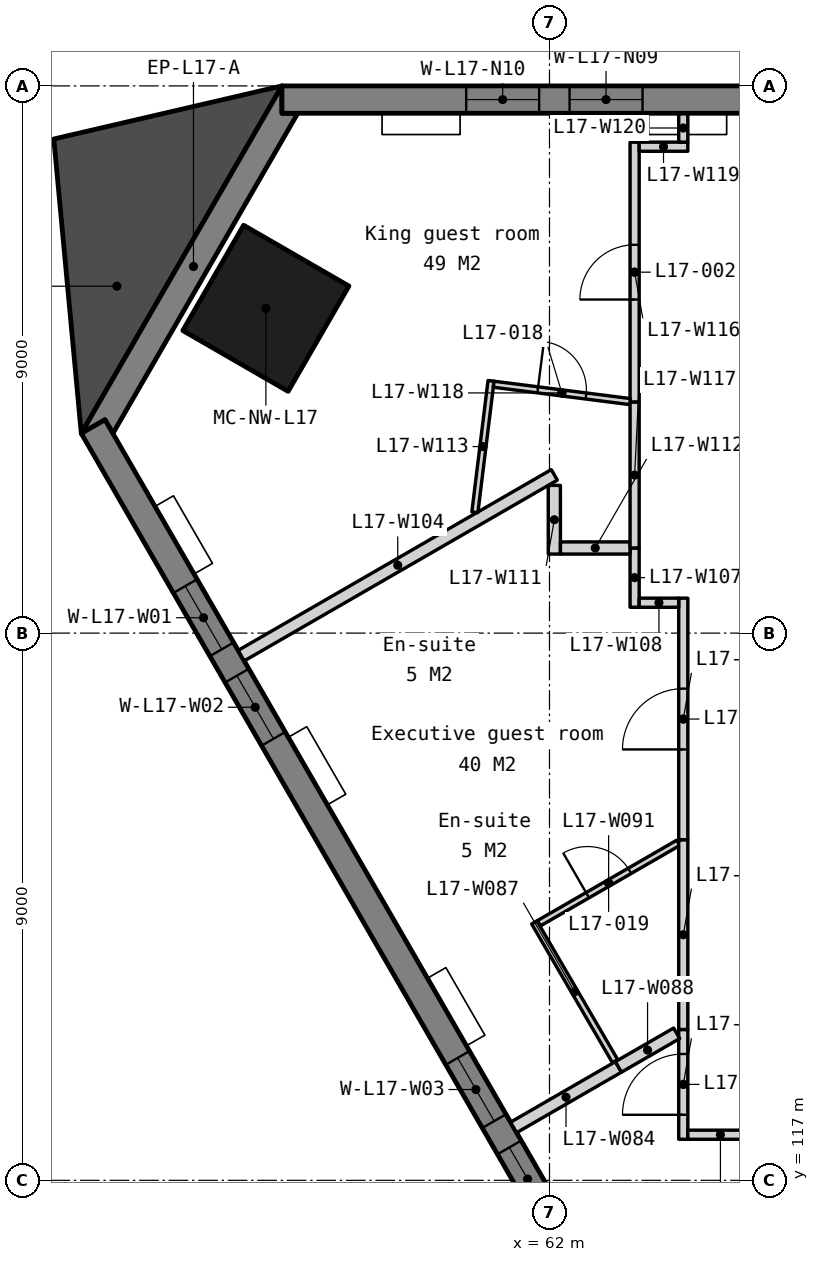
"""IFC4 building model, lengths in metres.
Left out: names, types, materials, properties, quantities, classifications, styles, units other than length and angle.
Written with IfcOpenShell. Run it as: python <this file> out.ifc"""

import sys

from ifc_helpers import new_model, si_unit, direction, frame, frame_2d, origin, origin_2d, place, context, subcontext, project, spatial, polyline, rectangle, outline, extrude, element, fill, save


model = new_model("IFC4")
c1 = context("Model", 3, precision=1e-05, world=origin(), true_north=direction((0.0, 1.0)))
c2 = subcontext(c1, "Body", "Model", "MODEL_VIEW")
j1 = project(units=[si_unit("LENGTHUNIT", "METRE"), si_unit("PLANEANGLEUNIT", "RADIAN")], contexts=[c1])
p1 = place(None, origin())
s1 = spatial("IfcSite", under=j1, at=p1, CompositionType="ELEMENT")
p2 = place(p1, origin())
s2 = spatial("IfcBuilding", under=s1, at=p2, CompositionType="ELEMENT")
p3 = place(p2, frame((0.0, 0.0, 73.5)))
s3 = spatial("IfcBuildingStorey", under=s2, at=p3, CompositionType="ELEMENT", Elevation=73.5)
p4 = place(p3, frame((57.336, 131.342, 0.0), z_axis=(0.0, 0.0, 1.0), x_axis=(-0.5, -0.866025403784, 0.0)))
e1 = element("IfcColumn", 1, at=p4, inside=s3, PredefinedType="COLUMN", context=c2, shape_type="SweptSolid", body=[
    extrude(rectangle(XDim=2.0, YDim=2.0, at=origin_2d()), origin(), (0.0, 0.0, 1.0), 3.5),
])
p5 = place(p3, frame((0.0, 0.0, -0.15)))
e2 = element("IfcWall", 2, at=p5, inside=s3, PredefinedType="SOLIDWALL", context=c2, shape_type="SweptSolid", body=[
    extrude(outline(polyline([(57.6, 135.0), (57.6, 134.55), (57.86, 134.55), (54.82, 129.284), (54.69, 129.509), (54.3, 129.284), (57.6, 135.0)])), origin(), (0.0, 0.0, 1.0), 3.4),
])
p6 = place(p3, frame((102.4, 134.775, -0.15), z_axis=(0.0, 0.0, 1.0), x_axis=(-1.0, 0.0, 0.0)))
e3 = element("IfcWall", 3, at=p6, inside=s3, PredefinedType="SOLIDWALL", context=c2, shape_type="SweptSolid", body=[
    extrude(outline(polyline([(44.8, 0.0), (44.8, 3.4), (0.0, 3.4), (0.0, 0.0), (44.8, 0.0)])), frame((0.0, 0.225, 0.0), z_axis=(0.0, -1.0, 0.0), x_axis=(1.0, 0.0, 0.0)), (0.0, 0.0, 1.0), 0.45),
])
p7 = place(p6, frame((3.03, 0.0, 1.05)))
e4 = element("IfcOpeningElement", 4, at=p7, cuts=e3, PredefinedType="OPENING", context=c2, shape_type="SweptSolid", body=[
    extrude(rectangle(XDim=1.2, YDim=1.5, at=frame_2d((0.6, 0.75))), frame((0.0, 0.235, 0.0), z_axis=(0.0, -1.0, 0.0), x_axis=(1.0, 0.0, 0.0)), (0.0, 0.0, 1.0), 0.47),
])
p8 = place(p6, frame((4.73, 0.0, 1.05)))
e5 = element("IfcOpeningElement", 5, at=p8, cuts=e3, PredefinedType="OPENING", context=c2, shape_type="SweptSolid", body=[
    extrude(rectangle(XDim=1.2, YDim=1.5, at=frame_2d((0.6, 0.75))), frame((0.0, 0.235, 0.0), z_axis=(0.0, -1.0, 0.0), x_axis=(1.0, 0.0, 0.0)), (0.0, 0.0, 1.0), 0.47),
])
p9 = place(p6, frame((11.99, 0.0, 1.05)))
e6 = element("IfcOpeningElement", 6, at=p9, cuts=e3, PredefinedType="OPENING", context=c2, shape_type="SweptSolid", body=[
    extrude(rectangle(XDim=1.2, YDim=1.5, at=frame_2d((0.6, 0.75))), frame((0.0, 0.235, 0.0), z_axis=(0.0, -1.0, 0.0), x_axis=(1.0, 0.0, 0.0)), (0.0, 0.0, 1.0), 0.47),
])
p10 = place(p6, frame((13.69, 0.0, 1.05)))
e7 = element("IfcOpeningElement", 7, at=p10, cuts=e3, PredefinedType="OPENING", context=c2, shape_type="SweptSolid", body=[
    extrude(rectangle(XDim=1.2, YDim=1.5, at=frame_2d((0.6, 0.75))), frame((0.0, 0.235, 0.0), z_axis=(0.0, -1.0, 0.0), x_axis=(1.0, 0.0, 0.0)), (0.0, 0.0, 1.0), 0.47),
])
p11 = place(p6, frame((20.95, 0.0, 1.05)))
e8 = element("IfcOpeningElement", 8, at=p11, cuts=e3, PredefinedType="OPENING", context=c2, shape_type="SweptSolid", body=[
    extrude(rectangle(XDim=1.2, YDim=1.5, at=frame_2d((0.6, 0.75))), frame((0.0, 0.235, 0.0), z_axis=(0.0, -1.0, 0.0), x_axis=(1.0, 0.0, 0.0)), (0.0, 0.0, 1.0), 0.47),
])
p12 = place(p6, frame((22.65, 0.0, 1.05)))
e9 = element("IfcOpeningElement", 9, at=p12, cuts=e3, PredefinedType="OPENING", context=c2, shape_type="SweptSolid", body=[
    extrude(rectangle(XDim=1.2, YDim=1.5, at=frame_2d((0.6, 0.75))), frame((0.0, 0.235, 0.0), z_axis=(0.0, -1.0, 0.0), x_axis=(1.0, 0.0, 0.0)), (0.0, 0.0, 1.0), 0.47),
])
p13 = place(p6, frame((29.91, 0.0, 1.05)))
e10 = element("IfcOpeningElement", 10, at=p13, cuts=e3, PredefinedType="OPENING", context=c2, shape_type="SweptSolid", body=[
    extrude(rectangle(XDim=1.2, YDim=1.5, at=frame_2d((0.6, 0.75))), frame((0.0, 0.235, 0.0), z_axis=(0.0, -1.0, 0.0), x_axis=(1.0, 0.0, 0.0)), (0.0, 0.0, 1.0), 0.47),
])
p14 = place(p6, frame((31.61, 0.0, 1.05)))
e11 = element("IfcOpeningElement", 11, at=p14, cuts=e3, PredefinedType="OPENING", context=c2, shape_type="SweptSolid", body=[
    extrude(rectangle(XDim=1.2, YDim=1.5, at=frame_2d((0.6, 0.75))), frame((0.0, 0.235, 0.0), z_axis=(0.0, -1.0, 0.0), x_axis=(1.0, 0.0, 0.0)), (0.0, 0.0, 1.0), 0.47),
])
p15 = place(p6, frame((38.87, 0.0, 1.05)))
e12 = element("IfcOpeningElement", 12, at=p15, cuts=e3, PredefinedType="OPENING", context=c2, shape_type="SweptSolid", body=[
    extrude(rectangle(XDim=1.2, YDim=1.5, at=frame_2d((0.6, 0.75))), frame((0.0, 0.235, 0.0), z_axis=(0.0, -1.0, 0.0), x_axis=(1.0, 0.0, 0.0)), (0.0, 0.0, 1.0), 0.47),
])
p16 = place(p6, frame((40.57, 0.0, 1.05)))
e13 = element("IfcOpeningElement", 13, at=p16, cuts=e3, PredefinedType="OPENING", context=c2, shape_type="SweptSolid", body=[
    extrude(rectangle(XDim=1.2, YDim=1.5, at=frame_2d((0.6, 0.75))), frame((0.0, 0.235, 0.0), z_axis=(0.0, -1.0, 0.0), x_axis=(1.0, 0.0, 0.0)), (0.0, 0.0, 1.0), 0.47),
])
p17 = place(p3, frame((54.495, 129.397, -0.15), z_axis=(0.0, 0.0, 1.0), x_axis=(0.499999201451, -0.866025864826, 0.0)))
e14 = element("IfcWall", 14, at=p17, inside=s3, PredefinedType="SOLIDWALL", context=c2, shape_type="SweptSolid", body=[
    extrude(outline(polyline([(44.8, 0.0), (44.8, 3.4), (0.0, 3.4), (0.0, 0.0), (44.8, 0.0)])), frame((0.0, 0.225, 0.0), z_axis=(0.0, -1.0, 0.0), x_axis=(1.0, 0.0, 0.0)), (0.0, 0.0, 1.0), 0.45),
])
p18 = place(p17, frame((3.03, 0.0, 1.05)))
e15 = element("IfcOpeningElement", 15, at=p18, cuts=e14, PredefinedType="OPENING", context=c2, shape_type="SweptSolid", body=[
    extrude(rectangle(XDim=1.2, YDim=1.5, at=frame_2d((0.6, 0.75))), frame((0.0, 0.235, 0.0), z_axis=(0.0, -1.0, 0.0), x_axis=(1.0, 0.0, 0.0)), (0.0, 0.0, 1.0), 0.47),
])
p19 = place(p17, frame((4.73, 0.0, 1.05)))
e16 = element("IfcOpeningElement", 16, at=p19, cuts=e14, PredefinedType="OPENING", context=c2, shape_type="SweptSolid", body=[
    extrude(rectangle(XDim=1.2, YDim=1.5, at=frame_2d((0.6, 0.75))), frame((0.0, 0.235, 0.0), z_axis=(0.0, -1.0, 0.0), x_axis=(1.0, 0.0, 0.0)), (0.0, 0.0, 1.0), 0.47),
])
p20 = place(p17, frame((11.99, 0.0, 1.05)))
e17 = element("IfcOpeningElement", 17, at=p20, cuts=e14, PredefinedType="OPENING", context=c2, shape_type="SweptSolid", body=[
    extrude(rectangle(XDim=1.2, YDim=1.5, at=frame_2d((0.6, 0.75))), frame((0.0, 0.235, 0.0), z_axis=(0.0, -1.0, 0.0), x_axis=(1.0, 0.0, 0.0)), (0.0, 0.0, 1.0), 0.47),
])
p21 = place(p17, frame((13.69, 0.0, 1.05)))
e18 = element("IfcOpeningElement", 18, at=p21, cuts=e14, PredefinedType="OPENING", context=c2, shape_type="SweptSolid", body=[
    extrude(rectangle(XDim=1.2, YDim=1.5, at=frame_2d((0.6, 0.75))), frame((0.0, 0.235, 0.0), z_axis=(0.0, -1.0, 0.0), x_axis=(1.0, 0.0, 0.0)), (0.0, 0.0, 1.0), 0.47),
])
p22 = place(p17, frame((20.95, 0.0, 1.05)))
e19 = element("IfcOpeningElement", 19, at=p22, cuts=e14, PredefinedType="OPENING", context=c2, shape_type="SweptSolid", body=[
    extrude(rectangle(XDim=1.2, YDim=1.5, at=frame_2d((0.6, 0.75))), frame((0.0, 0.235, 0.0), z_axis=(0.0, -1.0, 0.0), x_axis=(1.0, 0.0, 0.0)), (0.0, 0.0, 1.0), 0.47),
])
p23 = place(p17, frame((22.65, 0.0, 1.05)))
e20 = element("IfcOpeningElement", 20, at=p23, cuts=e14, PredefinedType="OPENING", context=c2, shape_type="SweptSolid", body=[
    extrude(rectangle(XDim=1.2, YDim=1.5, at=frame_2d((0.6, 0.75))), frame((0.0, 0.235, 0.0), z_axis=(0.0, -1.0, 0.0), x_axis=(1.0, 0.0, 0.0)), (0.0, 0.0, 1.0), 0.47),
])
p24 = place(p17, frame((29.91, 0.0, 1.05)))
e21 = element("IfcOpeningElement", 21, at=p24, cuts=e14, PredefinedType="OPENING", context=c2, shape_type="SweptSolid", body=[
    extrude(rectangle(XDim=1.2, YDim=1.5, at=frame_2d((0.6, 0.75))), frame((0.0, 0.235, 0.0), z_axis=(0.0, -1.0, 0.0), x_axis=(1.0, 0.0, 0.0)), (0.0, 0.0, 1.0), 0.47),
])
p25 = place(p17, frame((31.61, 0.0, 1.05)))
e22 = element("IfcOpeningElement", 22, at=p25, cuts=e14, PredefinedType="OPENING", context=c2, shape_type="SweptSolid", body=[
    extrude(rectangle(XDim=1.2, YDim=1.5, at=frame_2d((0.6, 0.75))), frame((0.0, 0.235, 0.0), z_axis=(0.0, -1.0, 0.0), x_axis=(1.0, 0.0, 0.0)), (0.0, 0.0, 1.0), 0.47),
])
p26 = place(p17, frame((38.87, 0.0, 1.05)))
e23 = element("IfcOpeningElement", 23, at=p26, cuts=e14, PredefinedType="OPENING", context=c2, shape_type="SweptSolid", body=[
    extrude(rectangle(XDim=1.2, YDim=1.5, at=frame_2d((0.6, 0.75))), frame((0.0, 0.235, 0.0), z_axis=(0.0, -1.0, 0.0), x_axis=(1.0, 0.0, 0.0)), (0.0, 0.0, 1.0), 0.47),
])
p27 = place(p17, frame((40.57, 0.0, 1.05)))
e24 = element("IfcOpeningElement", 24, at=p27, cuts=e14, PredefinedType="OPENING", context=c2, shape_type="SweptSolid", body=[
    extrude(rectangle(XDim=1.2, YDim=1.5, at=frame_2d((0.6, 0.75))), frame((0.0, 0.235, 0.0), z_axis=(0.0, -1.0, 0.0), x_axis=(1.0, 0.0, 0.0)), (0.0, 0.0, 1.0), 0.47),
])
p28 = place(p3, frame((0.0, 0.0, -0.15)))
e25 = element("IfcWall", 25, at=p28, inside=s3, PredefinedType="SOLIDWALL", context=c2, shape_type="SweptSolid", body=[
    extrude(outline(polyline([(57.6, 135.0), (53.848, 134.127), (54.3, 129.284), (57.6, 135.0)])), origin(), (0.0, 0.0, 1.0), 3.4),
])
p29 = place(p3, frame((64.2, 117.675, 0.0), z_axis=(0.0, 0.0, 1.0), x_axis=(0.0, 1.0, 0.0)))
e26 = element("IfcWall", 26, at=p29, inside=s3, PredefinedType="PARTITIONING", context=c2, shape_type="SweptSolid", body=[
    extrude(rectangle(XDim=1.806, YDim=0.15, at=frame_2d((0.903, 0.0))), origin(), (0.0, 0.0, 1.0), 3.25),
])
p30 = place(p29, frame((0.403, 0.0, 0.0)))
e27 = element("IfcOpeningElement", 27, at=p30, cuts=e26, PredefinedType="OPENING", context=c2, shape_type="SweptSolid", body=[
    extrude(rectangle(XDim=1.0, YDim=2.1, at=frame_2d((0.5, 1.05))), frame((0.0, 0.085, 0.0), z_axis=(0.0, -1.0, 0.0), x_axis=(1.0, 0.0, 0.0)), (0.0, 0.0, 1.0), 0.17),
])
p31 = place(p3, frame((64.275, 117.75, 0.0), z_axis=(0.0, 0.0, 1.0), x_axis=(1.0, 0.0, 0.0)))
e28 = element("IfcWall", 28, at=p31, inside=s3, PredefinedType="PARTITIONING", context=c2, shape_type="SweptSolid", body=[
    extrude(rectangle(XDim=1.072, YDim=0.15, at=frame_2d((0.536, 0.0))), origin(), (0.0, 0.0, 1.0), 3.25),
])
p32 = place(p3, frame((61.41, 117.87, 0.0), z_axis=(0.0, 0.0, 1.0), x_axis=(0.866038551572, 0.499977226672, 0.0)))
e29 = element("IfcWall", 29, at=p32, inside=s3, PredefinedType="PARTITIONING", context=c2, shape_type="SweptSolid", body=[
    extrude(rectangle(XDim=1.991, YDim=0.2, at=frame_2d((0.995, 0.0))), origin(), (0.0, 0.0, 1.0), 3.25),
])
p33 = place(p3, frame((61.75, 121.242, 0.0), z_axis=(0.0, 0.0, 1.0), x_axis=(0.503163628445, -0.86419116115, 0.0)))
e30 = element("IfcWall", 30, at=p33, inside=s3, PredefinedType="PARTITIONING", context=c2, shape_type="SweptSolid", body=[
    extrude(rectangle(XDim=2.64, YDim=0.1, at=frame_2d((1.32, 0.0))), origin(), (0.0, 0.0, 1.0), 3.25),
])
p34 = place(p3, frame((63.134, 118.865, 0.0), z_axis=(0.0, 0.0, 1.0), x_axis=(0.866075331272, 0.499913513082, 0.0)))
e31 = element("IfcWall", 31, at=p34, inside=s3, PredefinedType="PARTITIONING", context=c2, shape_type="SweptSolid", body=[
    extrude(rectangle(XDim=1.106, YDim=0.2, at=frame_2d((0.553, 0.0))), origin(), (0.0, 0.0, 1.0), 3.25),
])
p35 = place(p3, frame((61.827, 121.229, 0.0), z_axis=(0.0, 0.0, 1.0), x_axis=(0.86601342167, 0.500020753057, 0.0)))
e32 = element("IfcWall", 32, at=p35, inside=s3, PredefinedType="PARTITIONING", context=c2, shape_type="SweptSolid", body=[
    extrude(rectangle(XDim=2.645, YDim=0.1, at=frame_2d((1.323, 0.0))), origin(), (0.0, 0.0, 1.0), 3.25),
])
p36 = place(p35, frame((0.923, 0.0, 0.0)))
e33 = element("IfcOpeningElement", 33, at=p36, cuts=e32, PredefinedType="OPENING", context=c2, shape_type="SweptSolid", body=[
    extrude(rectangle(XDim=0.8, YDim=2.1, at=frame_2d((0.4, 1.05))), frame((0.0, 0.06, 0.0), z_axis=(0.0, -1.0, 0.0), x_axis=(1.0, 0.0, 0.0)), (0.0, 0.0, 1.0), 0.12),
])
p37 = place(p3, frame((64.2, 122.599, 0.0), z_axis=(0.0, 0.0, 1.0), x_axis=(0.0, 1.0, 0.0)))
e34 = element("IfcWall", 34, at=p37, inside=s3, PredefinedType="PARTITIONING", context=c2, shape_type="SweptSolid", body=[
    extrude(rectangle(XDim=3.976, YDim=0.15, at=frame_2d((1.988, 0.0))), origin(), (0.0, 0.0, 1.0), 3.25),
])
p38 = place(p37, frame((1.488, 0.0, 0.0)))
e35 = element("IfcOpeningElement", 35, at=p38, cuts=e34, PredefinedType="OPENING", context=c2, shape_type="SweptSolid", body=[
    extrude(rectangle(XDim=1.0, YDim=2.1, at=frame_2d((0.5, 1.05))), frame((0.0, 0.085, 0.0), z_axis=(0.0, -1.0, 0.0), x_axis=(1.0, 0.0, 0.0)), (0.0, 0.0, 1.0), 0.17),
])
p39 = place(p3, frame((64.2, 119.481, 0.0), z_axis=(0.0, 0.0, 1.0), x_axis=(0.0, 1.0, 0.0)))
e36 = element("IfcWall", 36, at=p39, inside=s3, PredefinedType="PARTITIONING", context=c2, shape_type="SweptSolid", body=[
    extrude(rectangle(XDim=3.118, YDim=0.15, at=frame_2d((1.559, 0.0))), origin(), (0.0, 0.0, 1.0), 3.25),
])
p40 = place(p3, frame((56.93, 125.629, 0.0), z_axis=(0.0, 0.0, 1.0), x_axis=(0.86602627898, 0.499998484114, 0.0)))
e37 = element("IfcWall", 37, at=p40, inside=s3, PredefinedType="PARTITIONING", context=c2, shape_type="SweptSolid", body=[
    extrude(rectangle(XDim=5.946, YDim=0.2, at=frame_2d((2.973, 0.0))), origin(), (0.0, 0.0, 1.0), 3.25),
])
p41 = place(p3, frame((63.4, 126.425, 0.0), z_axis=(0.0, 0.0, 1.0), x_axis=(0.0, 1.0, 0.0)))
e38 = element("IfcWall", 38, at=p41, inside=s3, PredefinedType="PARTITIONING", context=c2, shape_type="SweptSolid", body=[
    extrude(rectangle(XDim=0.975, YDim=0.15, at=frame_2d((0.487, 0.0))), origin(), (0.0, 0.0, 1.0), 3.25),
])
p42 = place(p3, frame((63.475, 126.5, 0.0), z_axis=(0.0, 0.0, 1.0), x_axis=(1.0, 0.0, 0.0)))
e39 = element("IfcWall", 39, at=p42, inside=s3, PredefinedType="PARTITIONING", context=c2, shape_type="SweptSolid", body=[
    extrude(rectangle(XDim=0.65, YDim=0.15, at=frame_2d((0.325, 0.0))), origin(), (0.0, 0.0, 1.0), 3.25),
])
p43 = place(p3, frame((62.08, 127.3, 0.0), z_axis=(0.0, 0.0, 1.0), x_axis=(-0.000648508294, 0.999999789718, 0.0)))
e40 = element("IfcWall", 40, at=p43, inside=s3, PredefinedType="PARTITIONING", context=c2, shape_type="SweptSolid", body=[
    extrude(rectangle(XDim=1.129, YDim=0.2, at=frame_2d((0.565, 0.0))), origin(), (0.0, 0.0, 1.0), 3.25),
])
p44 = place(p3, frame((62.18, 127.4, 0.0), z_axis=(0.0, 0.0, 1.0), x_axis=(1.0, 0.0, 0.0)))
e41 = element("IfcWall", 41, at=p44, inside=s3, PredefinedType="PARTITIONING", context=c2, shape_type="SweptSolid", body=[
    extrude(rectangle(XDim=1.145, YDim=0.2, at=frame_2d((0.573, 0.0))), origin(), (0.0, 0.0, 1.0), 3.25),
])
p45 = place(p3, frame((60.772, 127.986, 0.0), z_axis=(0.0, 0.0, 1.0), x_axis=(0.122228209351, 0.992502022587, 0.0)))
e42 = element("IfcWall", 42, at=p45, inside=s3, PredefinedType="PARTITIONING", context=c2, shape_type="SweptSolid", body=[
    extrude(rectangle(XDim=2.179, YDim=0.1, at=frame_2d((1.09, 0.0))), origin(), (0.0, 0.0, 1.0), 3.25),
])
p46 = place(p3, frame((63.4, 129.798, 0.0), z_axis=(0.0, 0.0, 1.0), x_axis=(0.0, 1.0, 0.0)))
e43 = element("IfcWall", 43, at=p46, inside=s3, PredefinedType="PARTITIONING", context=c2, shape_type="SweptSolid", body=[
    extrude(rectangle(XDim=4.276, YDim=0.15, at=frame_2d((2.138, 0.0))), origin(), (0.0, 0.0, 1.0), 3.25),
])
p47 = place(p46, frame((1.688, 0.0, 0.0)))
e44 = element("IfcOpeningElement", 44, at=p47, cuts=e43, PredefinedType="OPENING", context=c2, shape_type="SweptSolid", body=[
    extrude(rectangle(XDim=0.9, YDim=2.1, at=frame_2d((0.45, 1.05))), frame((0.0, 0.085, 0.0), z_axis=(0.0, -1.0, 0.0), x_axis=(1.0, 0.0, 0.0)), (0.0, 0.0, 1.0), 0.17),
])
p48 = place(p3, frame((63.4, 127.4, 0.0), z_axis=(0.0, 0.0, 1.0), x_axis=(0.0, 1.0, 0.0)))
e45 = element("IfcWall", 45, at=p48, inside=s3, PredefinedType="PARTITIONING", context=c2, shape_type="SweptSolid", body=[
    extrude(rectangle(XDim=2.398, YDim=0.15, at=frame_2d((1.199, 0.0))), origin(), (0.0, 0.0, 1.0), 3.25),
])
p49 = place(p3, frame((61.082, 130.093, 0.0), z_axis=(0.0, 0.0, 1.0), x_axis=(0.99199127296, -0.126306430445, 0.0)))
e46 = element("IfcWall", 46, at=p49, inside=s3, PredefinedType="PARTITIONING", context=c2, shape_type="SweptSolid", body=[
    extrude(rectangle(XDim=2.261, YDim=0.1, at=frame_2d((1.131, 0.0))), origin(), (0.0, 0.0, 1.0), 3.25),
])
p50 = place(p49, frame((0.731, 0.0, 0.0)))
e47 = element("IfcOpeningElement", 47, at=p50, cuts=e46, PredefinedType="OPENING", context=c2, shape_type="SweptSolid", body=[
    extrude(rectangle(XDim=0.8, YDim=2.1, at=frame_2d((0.4, 1.05))), frame((0.0, 0.06, 0.0), z_axis=(0.0, -1.0, 0.0), x_axis=(1.0, 0.0, 0.0)), (0.0, 0.0, 1.0), 0.12),
])
p51 = place(p3, frame((63.475, 134.0, 0.0), z_axis=(0.0, 0.0, 1.0), x_axis=(0.999999813645, 0.000610500497, 0.0)))
e48 = element("IfcWall", 48, at=p51, inside=s3, PredefinedType="PARTITIONING", context=c2, shape_type="SweptSolid", body=[
    extrude(rectangle(XDim=0.8, YDim=0.15, at=frame_2d((0.4, 0.0))), origin(), (0.0, 0.0, 1.0), 3.25),
])
p52 = place(p3, frame((64.2, 134.075, 0.0), z_axis=(0.0, 0.0, 1.0), x_axis=(0.0, 1.0, 0.0)))
e49 = element("IfcWall", 49, at=p52, inside=s3, PredefinedType="PARTITIONING", context=c2, shape_type="SweptSolid", body=[
    extrude(rectangle(XDim=0.465, YDim=0.15, at=frame_2d((0.232, 0.0))), origin(), (0.0, 0.0, 1.0), 3.25),
])
p53 = place(p15, origin())
e50 = element("IfcWindow", 50, at=p53, inside=s3, PartitioningType="SINGLE_PANEL", PredefinedType="WINDOW", context=c2, shape_type="SweptSolid", body=[
    extrude(rectangle(XDim=1.2, YDim=1.5, at=frame_2d((0.6, 0.75))), frame((0.0, 0.03, 0.0), z_axis=(0.0, -1.0, 0.0), x_axis=(1.0, 0.0, 0.0)), (0.0, 0.0, 1.0), 0.06),
])
fill(e12, e50)
p54 = place(p16, origin())
e51 = element("IfcWindow", 51, at=p54, inside=s3, PartitioningType="SINGLE_PANEL", PredefinedType="WINDOW", context=c2, shape_type="SweptSolid", body=[
    extrude(rectangle(XDim=1.2, YDim=1.5, at=frame_2d((0.6, 0.75))), frame((0.0, 0.03, 0.0), z_axis=(0.0, -1.0, 0.0), x_axis=(1.0, 0.0, 0.0)), (0.0, 0.0, 1.0), 0.06),
])
fill(e13, e51)
p55 = place(p18, origin())
e52 = element("IfcWindow", 52, at=p55, inside=s3, PartitioningType="SINGLE_PANEL", PredefinedType="WINDOW", context=c2, shape_type="SweptSolid", body=[
    extrude(rectangle(XDim=1.2, YDim=1.5, at=frame_2d((0.6, 0.75))), frame((0.0, 0.03, 0.0), z_axis=(0.0, -1.0, 0.0), x_axis=(1.0, 0.0, 0.0)), (0.0, 0.0, 1.0), 0.06),
])
fill(e15, e52)
p56 = place(p19, origin())
e53 = element("IfcWindow", 53, at=p56, inside=s3, PartitioningType="SINGLE_PANEL", PredefinedType="WINDOW", context=c2, shape_type="SweptSolid", body=[
    extrude(rectangle(XDim=1.2, YDim=1.5, at=frame_2d((0.6, 0.75))), frame((0.0, 0.03, 0.0), z_axis=(0.0, -1.0, 0.0), x_axis=(1.0, 0.0, 0.0)), (0.0, 0.0, 1.0), 0.06),
])
fill(e16, e53)
p57 = place(p20, origin())
e54 = element("IfcWindow", 54, at=p57, inside=s3, PartitioningType="SINGLE_PANEL", PredefinedType="WINDOW", context=c2, shape_type="SweptSolid", body=[
    extrude(rectangle(XDim=1.2, YDim=1.5, at=frame_2d((0.6, 0.75))), frame((0.0, 0.03, 0.0), z_axis=(0.0, -1.0, 0.0), x_axis=(1.0, 0.0, 0.0)), (0.0, 0.0, 1.0), 0.06),
])
fill(e17, e54)
p58 = place(p21, origin())
e55 = element("IfcWindow", 55, at=p58, inside=s3, PartitioningType="SINGLE_PANEL", PredefinedType="WINDOW", context=c2, shape_type="SweptSolid", body=[
    extrude(rectangle(XDim=1.2, YDim=1.5, at=frame_2d((0.6, 0.75))), frame((0.0, 0.03, 0.0), z_axis=(0.0, -1.0, 0.0), x_axis=(1.0, 0.0, 0.0)), (0.0, 0.0, 1.0), 0.06),
])
fill(e18, e55)
p59 = place(p47, origin())
e56 = element("IfcDoor", 56, at=p59, inside=s3, OperationType="SINGLE_SWING_LEFT", PredefinedType="DOOR", context=c2, shape_type="SweptSolid", body=[
    extrude(rectangle(XDim=0.9, YDim=2.1, at=frame_2d((0.45, 1.05))), frame((0.0, 0.025, 0.0), z_axis=(0.0, -1.0, 0.0), x_axis=(1.0, 0.0, 0.0)), (0.0, 0.0, 1.0), 0.05),
])
fill(e44, e56)
p60 = place(p38, origin())
e57 = element("IfcDoor", 57, at=p60, inside=s3, OperationType="SINGLE_SWING_LEFT", PredefinedType="DOOR", context=c2, shape_type="SweptSolid", body=[
    extrude(rectangle(XDim=1.0, YDim=2.1, at=frame_2d((0.5, 1.05))), frame((0.0, 0.025, 0.0), z_axis=(0.0, -1.0, 0.0), x_axis=(1.0, 0.0, 0.0)), (0.0, 0.0, 1.0), 0.05),
])
fill(e35, e57)
p61 = place(p30, origin())
e58 = element("IfcDoor", 58, at=p61, inside=s3, OperationType="SINGLE_SWING_LEFT", PredefinedType="DOOR", context=c2, shape_type="SweptSolid", body=[
    extrude(rectangle(XDim=1.0, YDim=2.1, at=frame_2d((0.5, 1.05))), frame((0.0, 0.025, 0.0), z_axis=(0.0, -1.0, 0.0), x_axis=(1.0, 0.0, 0.0)), (0.0, 0.0, 1.0), 0.05),
])
fill(e27, e58)
p62 = place(p50, origin())
e59 = element("IfcDoor", 59, at=p62, inside=s3, OperationType="SINGLE_SWING_LEFT", PredefinedType="DOOR", context=c2, shape_type="SweptSolid", body=[
    extrude(rectangle(XDim=0.8, YDim=2.1, at=frame_2d((0.4, 1.05))), frame((0.0, 0.025, 0.0), z_axis=(0.0, -1.0, 0.0), x_axis=(1.0, 0.0, 0.0)), (0.0, 0.0, 1.0), 0.05),
])
fill(e47, e59)
p63 = place(p36, origin())
e60 = element("IfcDoor", 60, at=p63, inside=s3, OperationType="SINGLE_SWING_LEFT", PredefinedType="DOOR", context=c2, shape_type="SweptSolid", body=[
    extrude(rectangle(XDim=0.8, YDim=2.1, at=frame_2d((0.4, 1.05))), frame((0.0, 0.025, 0.0), z_axis=(0.0, -1.0, 0.0), x_axis=(1.0, 0.0, 0.0)), (0.0, 0.0, 1.0), 0.05),
])
fill(e33, e60)
save(model, sys.argv[1])
